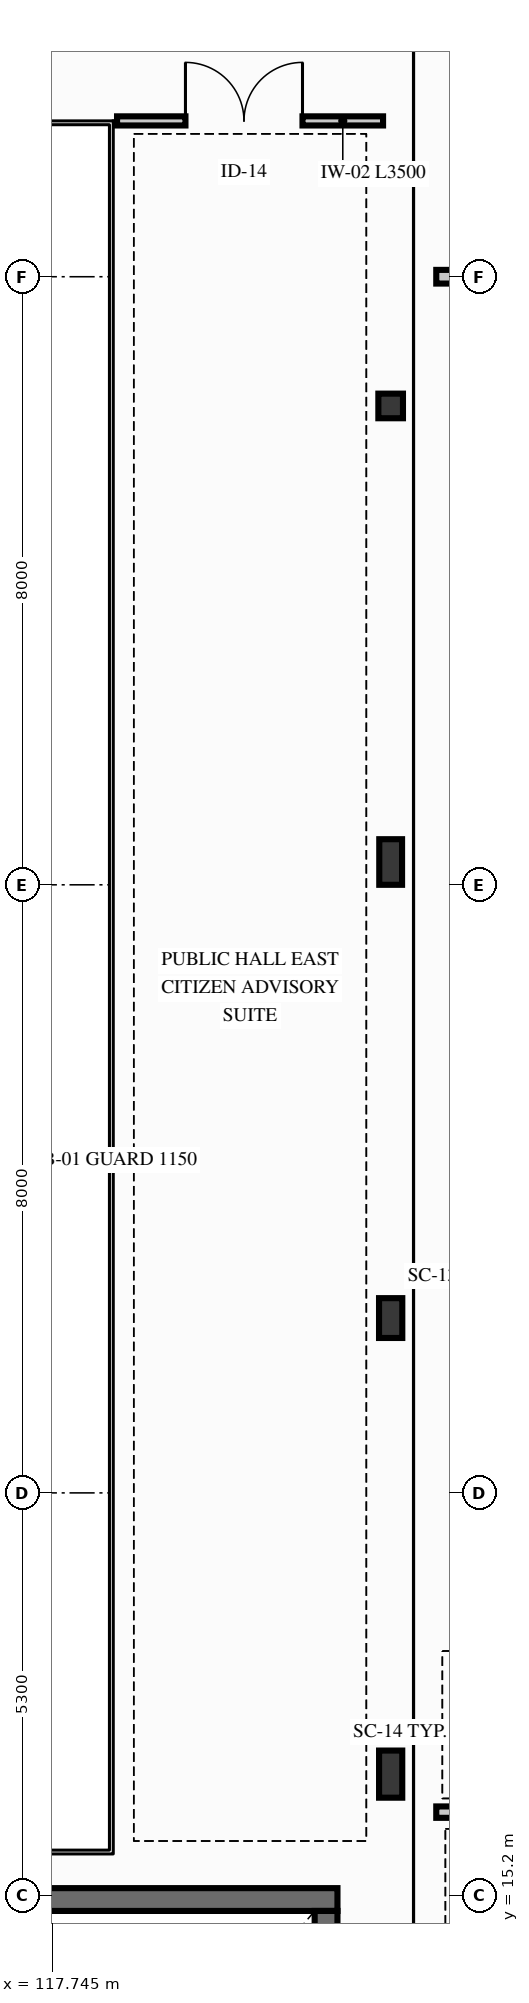
"""IFC4 building model, lengths in metres.
Left out: names, types, materials, properties, quantities, classifications, styles, units other than length and angle.
Written with IfcOpenShell. Run it as: python <this file> out.ifc"""

import sys

from ifc_helpers import new_model, si_unit, direction, frame, frame_2d, origin, origin_2d, place, context, subcontext, project, spatial, rectangle, hollow_circle, i_section, extrude, element, fill, save


model = new_model("IFC4")
c1 = context("Model", 3, precision=1e-05, world=origin(), true_north=direction((0.0, 1.0)))
c2 = subcontext(c1, "Body", "Model", "MODEL_VIEW")
j1 = project(units=[si_unit("LENGTHUNIT", "METRE"), si_unit("PLANEANGLEUNIT", "RADIAN")], contexts=[c1])
p1 = place(None, origin())
s1 = spatial("IfcSite", under=j1, at=p1, CompositionType="ELEMENT")
p2 = place(p1, origin())
s2 = spatial("IfcBuilding", under=s1, at=p2, CompositionType="ELEMENT")
p3 = place(p2, frame((0.0, 0.0, 5.1)))
s3 = spatial("IfcBuildingStorey", under=s2, at=p3, CompositionType="ELEMENT", Elevation=5.1)
p4 = place(p3, frame((113.3, 15.15, 0.0), z_axis=(0.0, 0.0, 1.0), x_axis=(1.0, 0.0, 0.0)))
e1 = element("IfcWall", 1, at=p4, inside=s3, PredefinedType="SHEAR", context=c2, shape_type="SweptSolid", body=[
    extrude(rectangle(XDim=8.2, YDim=0.3, at=frame_2d((4.1, 0.0))), origin(), (0.0, 0.0, 1.0), 3.96),
])
p5 = place(p3, frame((121.35, 8.2, 0.0), z_axis=(0.0, 0.0, 1.0), x_axis=(0.0, 1.0, 0.0)))
e2 = element("IfcWall", 2, at=p5, inside=s3, PredefinedType="SHEAR", context=c2, shape_type="SweptSolid", body=[
    extrude(rectangle(XDim=6.8, YDim=0.3, at=frame_2d((3.4, 0.0))), origin(), (0.0, 0.0, 1.0), 3.96),
])
p6 = place(p3, frame((122.2, 16.8, 0.0), z_axis=(0.0, 0.0, 1.0), x_axis=(1.0, 0.0, 0.0)))
e3 = element("IfcColumn", 3, at=p6, inside=s3, PredefinedType="COLUMN", context=c2, shape_type="SweptSolid", body=[
    extrude(i_section(OverallWidth=0.305, OverallDepth=0.62, WebThickness=0.021, FlangeThickness=0.04, FilletRadius=0.027, at=origin_2d()), origin(), (0.0, 0.0, 1.0), 3.92),
])
p7 = place(p3, frame((122.2, 22.8, 0.0), z_axis=(0.0, 0.0, 1.0), x_axis=(1.0, 0.0, 0.0)))
e4 = element("IfcColumn", 4, at=p7, inside=s3, PredefinedType="COLUMN", context=c2, shape_type="SweptSolid", body=[
    extrude(i_section(OverallWidth=0.306, OverallDepth=0.524, WebThickness=0.021, FlangeThickness=0.04, FilletRadius=0.027, at=origin_2d()), origin(), (0.0, 0.0, 1.0), 3.92),
])
p8 = place(p3, frame((122.2, 28.8, 0.0), z_axis=(0.0, 0.0, 1.0), x_axis=(1.0, 0.0, 0.0)))
e5 = element("IfcColumn", 5, at=p8, inside=s3, PredefinedType="COLUMN", context=c2, shape_type="SweptSolid", body=[
    extrude(i_section(OverallWidth=0.3, OverallDepth=0.6, WebThickness=0.015, FlangeThickness=0.03, FilletRadius=0.027, at=origin_2d()), origin(), (0.0, 0.0, 1.0), 3.92),
])
p9 = place(p3, frame((122.2, 34.8, 0.0), z_axis=(0.0, 0.0, 1.0), x_axis=(1.0, 0.0, 0.0)))
e6 = element("IfcColumn", 6, at=p9, inside=s3, PredefinedType="COLUMN", context=c2, shape_type="SweptSolid", body=[
    extrude(hollow_circle(Radius=0.162, WallThickness=0.016, at=origin_2d()), origin(), (0.0, 0.0, 1.0), 3.92),
])
p10 = place(p3, frame((122.8, 36.5, 0.0), z_axis=(0.0, 0.0, 1.0), x_axis=(1.0, 0.0, 0.0)))
e7 = element("IfcWall", 7, at=p10, inside=s3, PredefinedType="PARTITIONING", context=c2, shape_type="SweptSolid", body=[
    extrude(rectangle(XDim=45.2, YDim=0.18, at=frame_2d((22.6, 0.0))), origin(), (0.0, 0.0, 1.0), 3.92),
])
p11 = place(p10, frame((8.0, 0.0, 0.0)))
e8 = element("IfcOpeningElement", 8, at=p11, cuts=e7, PredefinedType="OPENING", context=c2, shape_type="SweptSolid", body=[
    extrude(rectangle(XDim=1.05, YDim=2.2, at=frame_2d((0.525, 1.1))), frame((0.0, 0.1, 0.0), z_axis=(0.0, -1.0, 0.0), x_axis=(1.0, 0.0, 0.0)), (0.0, 0.0, 1.0), 0.2),
])
p12 = place(p10, frame((30.45, 0.0, 0.0)))
e9 = element("IfcOpeningElement", 9, at=p12, cuts=e7, PredefinedType="OPENING", context=c2, shape_type="SweptSolid", body=[
    extrude(rectangle(XDim=0.98, YDim=2.16, at=frame_2d((0.49, 1.08))), frame((0.0, 0.1, 0.0), z_axis=(0.0, -1.0, 0.0), x_axis=(1.0, 0.0, 0.0)), (0.0, 0.0, 1.0), 0.2),
])
p13 = place(p3, frame((122.8, 16.3, 0.0), z_axis=(0.0, 0.0, 1.0), x_axis=(1.0, 0.0, 0.0)))
e10 = element("IfcWall", 10, at=p13, inside=s3, PredefinedType="PARTITIONING", context=c2, shape_type="SweptSolid", body=[
    extrude(rectangle(XDim=32.2, YDim=0.15, at=frame_2d((16.1, 0.0))), origin(), (0.0, 0.0, 1.0), 3.92),
])
p14 = place(p13, frame((10.65, 0.0, 0.0)))
e11 = element("IfcOpeningElement", 11, at=p14, cuts=e10, PredefinedType="OPENING", context=c2, shape_type="SweptSolid", body=[
    extrude(rectangle(XDim=1.6, YDim=2.3, at=frame_2d((0.8, 1.15))), frame((0.0, 0.085, 0.0), z_axis=(0.0, -1.0, 0.0), x_axis=(1.0, 0.0, 0.0)), (0.0, 0.0, 1.0), 0.17),
])
p15 = place(p3, frame((118.6, 38.55, 0.0), z_axis=(0.0, 0.0, 1.0), x_axis=(1.0, 0.0, 0.0)))
e12 = element("IfcWall", 12, at=p15, inside=s3, PredefinedType="PARTITIONING", context=c2, shape_type="SweptSolid", body=[
    extrude(rectangle(XDim=3.5, YDim=0.12, at=frame_2d((1.75, 0.0))), origin(), (0.0, 0.0, 1.0), 3.92),
])
p16 = place(p15, frame((0.9, 0.0, 0.0)))
e13 = element("IfcOpeningElement", 13, at=p16, cuts=e12, PredefinedType="OPENING", context=c2, shape_type="SweptSolid", body=[
    extrude(rectangle(XDim=1.54, YDim=2.3, at=frame_2d((0.77, 1.15))), frame((0.0, 0.07, 0.0), z_axis=(0.0, -1.0, 0.0), x_axis=(1.0, 0.0, 0.0)), (0.0, 0.0, 1.0), 0.14),
])
p17 = place(p16, origin())
e14 = element("IfcDoor", 14, at=p17, inside=s3, OperationType="DOUBLE_DOOR_SINGLE_SWING", PredefinedType="DOOR", context=c2, shape_type="SweptSolid", body=[
    extrude(rectangle(XDim=1.54, YDim=2.3, at=frame_2d((0.77, 1.15))), frame((0.0, 0.025, 0.0), z_axis=(0.0, -1.0, 0.0), x_axis=(1.0, 0.0, 0.0)), (0.0, 0.0, 1.0), 0.05),
])
fill(e13, e14)
save(model, sys.argv[1])
